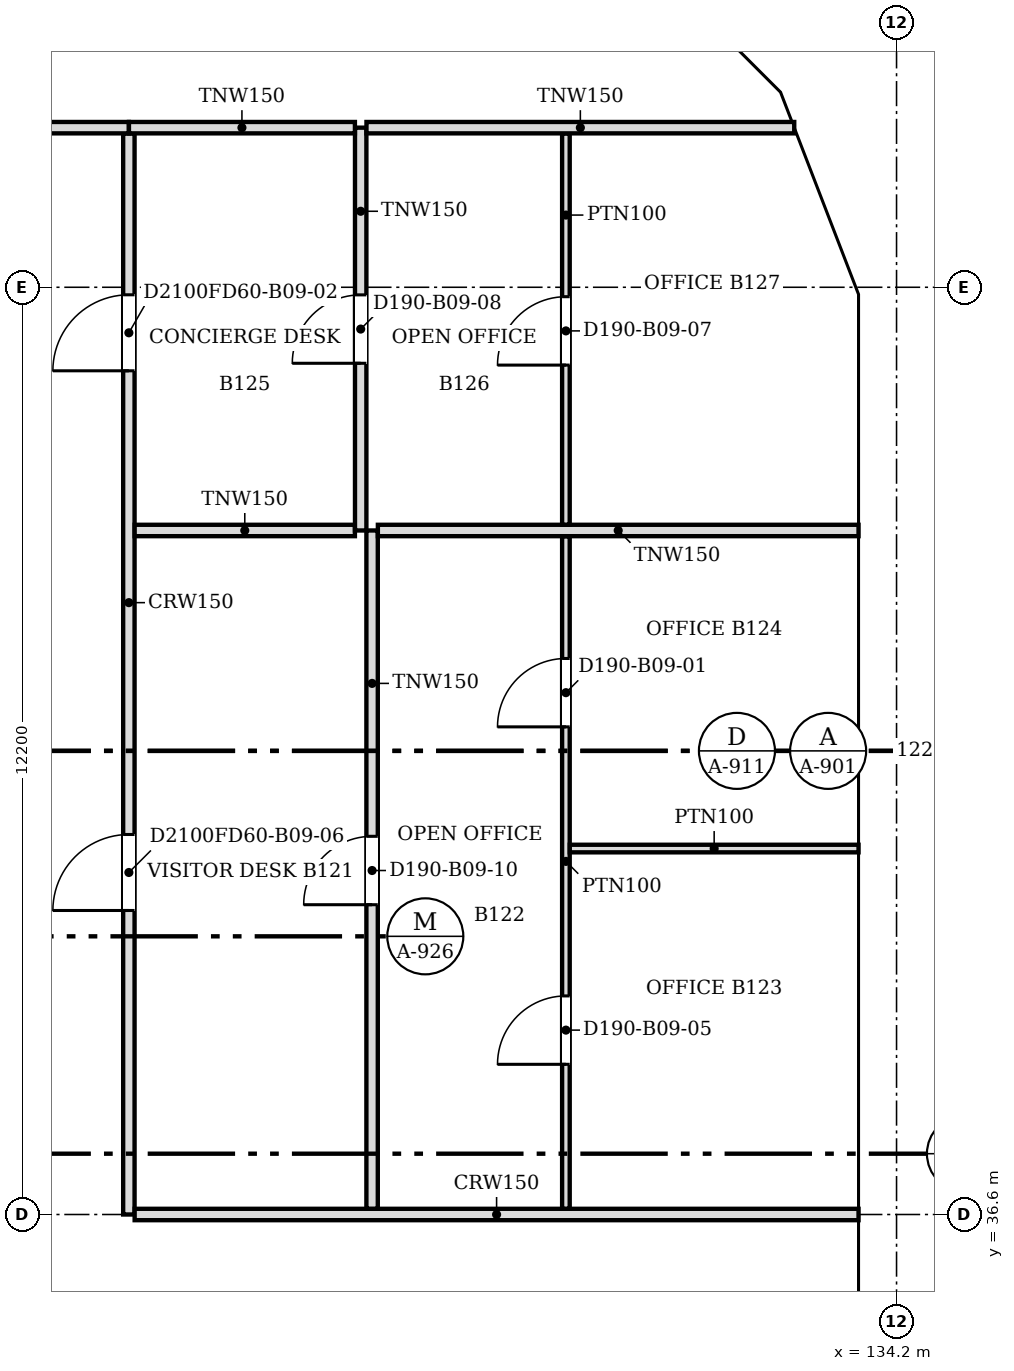
"""IFC4 building model, lengths in metres.
Left out: names, types, materials, properties, quantities, classifications, styles, units other than length and angle.
Written with IfcOpenShell. Run it as: python <this file> out.ifc"""

import sys

from ifc_helpers import new_model, si_unit, direction, frame, frame_2d, origin, place, context, subcontext, project, spatial, polyline, rectangle, outline, extrude, faceted_brep, source, transform, mapped, element, fill, save


model = new_model("IFC4")
c1 = context("Model", 3, precision=1e-05, world=origin(), true_north=direction((0.0, 1.0)))
c2 = subcontext(c1, "Body", "Model", "MODEL_VIEW")
j1 = project(units=[si_unit("LENGTHUNIT", "METRE"), si_unit("PLANEANGLEUNIT", "RADIAN")], contexts=[c1])
p1 = place(None, origin())
s1 = spatial("IfcSite", under=j1, at=p1, CompositionType="ELEMENT")
p2 = place(p1, origin())
s2 = spatial("IfcBuilding", under=s1, at=p2, CompositionType="ELEMENT")
p3 = place(p2, frame((0.0, 0.0, 87.6)))
s3 = spatial("IfcBuildingStorey", under=s2, at=p3, CompositionType="ELEMENT", Elevation=87.6)
m1 = source(origin(), c2, "Body", "Brep", [
    faceted_brep([(3.05, -0.25, 0.0), (6.1, -0.25, 3.8), (6.1, -0.25, 3.8), (3.05, -0.25, 7.6), (0.0, -0.25, 3.8), (0.0, 0.25, 3.8), (3.05, 0.25, 7.6), (6.1, 0.25, 3.8), (6.1, 0.25, 3.8), (3.05, 0.25, 0.0)], [[[0, 1, 2, 3, 4]], [[5, 6, 7, 8, 9]], [[9, 8, 1, 0]], [[7, 6, 3, 2]], [[6, 5, 4, 3]], [[5, 9, 0, 4]], [[1, 8, 7, 2]]]),
])
p4 = place(p3, frame((133.95, 33.55, -3.8), z_axis=(0.0, 0.0, 1.0), x_axis=(0.0, 1.0, 0.0)))
e1 = element("IfcWall", 1, at=p4, inside=s3, PredefinedType="SOLIDWALL", context=c2, shape_type="MappedRepresentation", body=[
    mapped(m1, transform((0.0, 0.0, 0.0), scale=1.0)),
])
m2 = source(origin(), c2, "Body", "SweptSolid", [
    extrude(outline(polyline([(3.05, 0.399), (5.78, 3.8), (3.05, 7.2), (0.321, 3.8), (3.05, 0.399)])), frame((0.0, 0.26, 0.0), z_axis=(0.0, -1.0, 0.0), x_axis=(1.0, 0.0, 0.0)), (0.0, 0.0, 1.0), 0.52),
])
p5 = place(p4, origin())
e2 = element("IfcOpeningElement", 2, at=p5, cuts=e1, PredefinedType="OPENING", context=c2, shape_type="MappedRepresentation", body=[
    mapped(m2, transform((0.0, 0.0, 0.0), scale=1.0)),
])
m3 = source(origin(), c2, "Body", "SweptSolid", [
    extrude(outline(polyline([(3.05, 0.0), (6.1, 3.8), (3.05, 7.6), (0.0, 3.8), (3.05, 0.0)])), frame((0.0, 0.25, 0.0), z_axis=(0.0, -1.0, 0.0), x_axis=(1.0, 0.0, 0.0)), (0.0, 0.0, 1.0), 0.5),
])
p6 = place(p3, frame((133.95, 39.65, -3.8), z_axis=(0.0, 0.0, 1.0), x_axis=(0.0, 1.0, 0.0)))
e3 = element("IfcWall", 3, at=p6, inside=s3, PredefinedType="SOLIDWALL", context=c2, shape_type="MappedRepresentation", body=[
    mapped(m3, transform((0.0, 0.0, 0.0), scale=1.0)),
])
p7 = place(p6, origin())
e4 = element("IfcOpeningElement", 4, at=p7, cuts=e3, PredefinedType="OPENING", context=c2, shape_type="MappedRepresentation", body=[
    mapped(m2, transform((0.0, 0.0, 0.0), scale=1.0)),
])
m4 = source(origin(), c2, "Body", "Brep", [
    faceted_brep([(3.003, -0.25, 0.0), (3.05, -0.25, 0.06), (3.05, -0.25, 7.54), (3.003, -0.25, 7.6), (0.0, -0.25, 3.8), (0.0, 0.25, 3.8), (2.957, 0.25, 7.541), (2.957, 0.25, 0.059), (3.003, 0.0, 0.0), (3.003, 0.0, 7.6)], [[[0, 1, 2, 3, 4]], [[5, 6, 7]], [[1, 0, 8]], [[9, 3, 2]], [[6, 5, 4, 3, 9]], [[5, 7, 8, 0, 4]], [[1, 8, 7, 6, 9, 2]]]),
])
p8 = place(p3, frame((133.95, 45.75, -3.8), z_axis=(0.0, 0.0, 1.0), x_axis=(0.0, 1.0, 0.0)))
e5 = element("IfcWall", 5, at=p8, inside=s3, PredefinedType="SOLIDWALL", context=c2, shape_type="MappedRepresentation", body=[
    mapped(m4, transform((0.0, 0.0, 0.0), scale=1.0)),
])
m5 = source(origin(), c2, "Body", "SweptSolid", [
    extrude(outline(polyline([(2.803, 6.944), (0.319, 3.8), (2.803, 0.656), (2.803, 6.944)])), frame((0.0, 0.26, 0.0), z_axis=(0.0, -1.0, 0.0), x_axis=(1.0, 0.0, 0.0)), (0.0, 0.0, 1.0), 0.52),
])
p9 = place(p8, origin())
e6 = element("IfcOpeningElement", 6, at=p9, cuts=e5, PredefinedType="OPENING", context=c2, shape_type="MappedRepresentation", body=[
    mapped(m5, transform((0.0, 0.0, 0.0), scale=1.0)),
])
m6 = source(origin(), c2, "Body", "Brep", [
    faceted_brep([(0.047, -0.25, 0.0), (2.997, -0.25, 3.8), (0.047, -0.25, 7.6), (0.0, -0.25, 7.541), (0.0, -0.25, 0.059), (0.093, 0.25, 7.54), (2.944, 0.25, 3.868), (2.944, 0.25, 3.732), (0.093, 0.25, 0.06), (2.997, 0.0, 3.8), (0.047, 0.0, 0.0), (0.047, 0.0, 7.6)], [[[0, 1, 2, 3, 4]], [[5, 6, 7, 8]], [[8, 7, 9, 1, 0, 10]], [[6, 5, 11, 2, 1, 9]], [[3, 2, 11]], [[10, 0, 4]], [[8, 10, 4, 3, 11, 5]], [[7, 6, 9]]]),
])
p10 = place(p3, frame((133.967, 48.71, -3.8), z_axis=(0.0, 0.0, 1.0), x_axis=(-0.359901446078, 0.932990326376, 0.0)))
e7 = element("IfcWall", 7, at=p10, inside=s3, PredefinedType="SOLIDWALL", context=c2, shape_type="MappedRepresentation", body=[
    mapped(m6, transform((0.0, 0.0, 0.0), scale=1.0)),
])
m7 = source(origin(), c2, "Body", "SweptSolid", [
    extrude(outline(polyline([(0.247, 0.665), (2.681, 3.8), (0.247, 6.935), (0.247, 0.665)])), frame((0.0, 0.26, 0.0), z_axis=(0.0, -1.0, 0.0), x_axis=(1.0, 0.0, 0.0)), (0.0, 0.0, 1.0), 0.52),
])
p11 = place(p10, origin())
e8 = element("IfcOpeningElement", 8, at=p11, cuts=e7, PredefinedType="OPENING", context=c2, shape_type="MappedRepresentation", body=[
    mapped(m7, transform((0.0, 0.0, 0.0), scale=1.0)),
])
m8 = source(origin(), c2, "Body", "Brep", [
    faceted_brep([(2.944, -0.25, 0.0), (2.997, -0.25, 0.068), (2.997, -0.25, 7.532), (2.944, -0.25, 7.6), (0.0, -0.25, 3.8), (0.053, 0.25, 3.868), (2.891, 0.25, 7.532), (2.891, 0.25, 0.068), (0.053, 0.25, 3.732), (2.944, 0.0, 0.0), (2.944, 0.0, 7.6), (0.0, 0.0, 3.8)], [[[0, 1, 2, 3, 4]], [[5, 6, 7, 8]], [[1, 0, 9]], [[10, 3, 2]], [[6, 5, 11, 4, 3, 10]], [[8, 7, 9, 0, 4, 11]], [[8, 11, 5]], [[1, 9, 7, 6, 10, 2]]]),
])
p12 = place(p3, frame((132.888, 51.506, -3.8), z_axis=(0.0, 0.0, 1.0), x_axis=(-0.707147509625, 0.707066050402, 0.0)))
e9 = element("IfcWall", 9, at=p12, inside=s3, PredefinedType="SOLIDWALL", context=c2, shape_type="MappedRepresentation", body=[
    mapped(m8, transform((0.0, 0.0, 0.0), scale=1.0)),
])
m9 = source(origin(), c2, "Body", "SweptSolid", [
    extrude(outline(polyline([(2.744, 6.934), (0.316, 3.8), (2.744, 0.666), (2.744, 6.934)])), frame((0.0, 0.26, 0.0), z_axis=(0.0, -1.0, 0.0), x_axis=(1.0, 0.0, 0.0)), (0.0, 0.0, 1.0), 0.52),
])
p13 = place(p12, origin())
e10 = element("IfcOpeningElement", 10, at=p13, cuts=e9, PredefinedType="OPENING", context=c2, shape_type="MappedRepresentation", body=[
    mapped(m9, transform((0.0, 0.0, 0.0), scale=1.0)),
])
p14 = place(p2, frame((0.0, 0.0, 91.4)))
s4 = spatial("IfcBuildingStorey", under=s2, at=p14, CompositionType="ELEMENT", Elevation=91.4)
m10 = source(origin(), c2, "Body", "SweptSolid", [
    extrude(outline(polyline([(3.05, 0.0), (6.1, 3.8), (3.05, 7.6), (0.0, 3.8), (3.05, 0.0)])), frame((0.0, 0.25, 0.0), z_axis=(0.0, -1.0, 0.0), x_axis=(1.0, 0.0, 0.0)), (0.0, 0.0, 1.0), 0.5),
])
p15 = place(p14, frame((133.95, 30.5, -3.8), z_axis=(0.0, 0.0, 1.0), x_axis=(0.0, 1.0, 0.0)))
e11 = element("IfcWall", 11, at=p15, inside=s4, PredefinedType="SOLIDWALL", context=c2, shape_type="MappedRepresentation", body=[
    mapped(m10, transform((0.0, 0.0, 0.0), scale=1.0)),
])
m11 = source(origin(), c2, "Body", "SweptSolid", [
    extrude(outline(polyline([(3.05, 0.399), (5.78, 3.8), (3.05, 7.2), (0.321, 3.8), (3.05, 0.399)])), frame((0.0, 0.26, 0.0), z_axis=(0.0, -1.0, 0.0), x_axis=(1.0, 0.0, 0.0)), (0.0, 0.0, 1.0), 0.52),
])
p16 = place(p15, origin())
e12 = element("IfcOpeningElement", 12, at=p16, cuts=e11, PredefinedType="OPENING", context=c2, shape_type="MappedRepresentation", body=[
    mapped(m11, transform((0.0, 0.0, 0.0), scale=1.0)),
])
m12 = source(origin(), c2, "Body", "Brep", [
    faceted_brep([(3.05, -0.25, 0.0), (6.1, -0.25, 3.8), (6.1, -0.25, 3.8), (3.05, -0.25, 7.6), (0.0, -0.25, 3.8), (0.0, 0.25, 3.8), (3.05, 0.25, 7.6), (6.1, 0.25, 3.8), (6.1, 0.25, 3.8), (3.05, 0.25, 0.0)], [[[0, 1, 2, 3, 4]], [[5, 6, 7, 8, 9]], [[9, 8, 1, 0]], [[7, 6, 3, 2]], [[6, 5, 4, 3]], [[5, 9, 0, 4]], [[1, 8, 7, 2]]]),
])
p17 = place(p14, frame((133.95, 36.6, -3.8), z_axis=(0.0, 0.0, 1.0), x_axis=(0.0, 1.0, 0.0)))
e13 = element("IfcWall", 13, at=p17, inside=s4, PredefinedType="SOLIDWALL", context=c2, shape_type="MappedRepresentation", body=[
    mapped(m12, transform((0.0, 0.0, 0.0), scale=1.0)),
])
p18 = place(p17, origin())
e14 = element("IfcOpeningElement", 14, at=p18, cuts=e13, PredefinedType="OPENING", context=c2, shape_type="MappedRepresentation", body=[
    mapped(m11, transform((0.0, 0.0, 0.0), scale=1.0)),
])
m13 = source(origin(), c2, "Body", "Brep", [
    faceted_brep([(3.05, -0.25, 0.0), (6.053, -0.25, 3.8), (3.05, -0.25, 7.6), (0.0, -0.25, 3.8), (0.0, 0.25, 3.8), (3.05, 0.25, 7.6), (6.007, 0.25, 3.859), (6.007, 0.25, 3.741), (3.05, 0.25, 0.0), (6.053, 0.0, 3.8)], [[[0, 1, 2, 3]], [[4, 5, 6, 7, 8]], [[8, 7, 9, 1, 0]], [[6, 5, 2, 1, 9]], [[5, 4, 3, 2]], [[4, 8, 0, 3]], [[9, 7, 6]]]),
])
p19 = place(p14, frame((133.95, 42.7, -3.8), z_axis=(0.0, 0.0, 1.0), x_axis=(0.0, 1.0, 0.0)))
e15 = element("IfcWall", 15, at=p19, inside=s4, PredefinedType="SOLIDWALL", context=c2, shape_type="MappedRepresentation", body=[
    mapped(m13, transform((0.0, 0.0, 0.0), scale=1.0)),
])
m14 = source(origin(), c2, "Body", "SweptSolid", [
    extrude(outline(polyline([(3.049, 0.401), (5.735, 3.8), (3.049, 7.199), (0.321, 3.8), (3.049, 0.401)])), frame((0.0, 0.26, 0.0), z_axis=(0.0, -1.0, 0.0), x_axis=(1.0, 0.0, 0.0)), (0.0, 0.0, 1.0), 0.52),
])
p20 = place(p19, origin())
e16 = element("IfcOpeningElement", 16, at=p20, cuts=e15, PredefinedType="OPENING", context=c2, shape_type="MappedRepresentation", body=[
    mapped(m14, transform((0.0, 0.0, 0.0), scale=1.0)),
])
m15 = source(origin(), c2, "Body", "Brep", [
    faceted_brep([(2.95, -0.25, 0.0), (3.003, -0.25, 0.068), (3.003, -0.25, 7.531), (2.95, -0.25, 7.6), (0.0, -0.25, 3.8), (0.047, 0.25, 3.86), (2.898, 0.25, 7.532), (2.898, 0.25, 0.068), (0.047, 0.25, 3.74), (2.95, 0.0, 0.0), (2.95, 0.0, 7.6), (0.0, 0.0, 3.8)], [[[0, 1, 2, 3, 4]], [[5, 6, 7, 8]], [[1, 0, 9]], [[10, 3, 2]], [[6, 5, 11, 4, 3, 10]], [[8, 7, 9, 0, 4, 11]], [[8, 11, 5]], [[1, 9, 7, 6, 10, 2]]]),
])
p21 = place(p14, frame((133.95, 48.753, -3.8), z_axis=(0.0, 0.0, 1.0), x_axis=(-0.359855894603, 0.933007896601, 0.0)))
e17 = element("IfcWall", 17, at=p21, inside=s4, PredefinedType="SOLIDWALL", context=c2, shape_type="MappedRepresentation", body=[
    mapped(m15, transform((0.0, 0.0, 0.0), scale=1.0)),
])
m16 = source(origin(), c2, "Body", "SweptSolid", [
    extrude(outline(polyline([(2.75, 6.935), (0.316, 3.8), (2.75, 0.665), (2.75, 6.935)])), frame((0.0, 0.26, 0.0), z_axis=(0.0, -1.0, 0.0), x_axis=(1.0, 0.0, 0.0)), (0.0, 0.0, 1.0), 0.52),
])
p22 = place(p21, origin())
e18 = element("IfcOpeningElement", 18, at=p22, cuts=e17, PredefinedType="OPENING", context=c2, shape_type="MappedRepresentation", body=[
    mapped(m16, transform((0.0, 0.0, 0.0), scale=1.0)),
])
m17 = source(origin(), c2, "Body", "Brep", [
    faceted_brep([(0.053, -0.25, 0.0), (2.997, -0.25, 3.8), (0.053, -0.25, 7.6), (0.0, -0.25, 7.532), (0.0, -0.25, 0.068), (0.106, 0.25, 7.531), (2.944, 0.25, 3.868), (2.944, 0.25, 3.732), (0.106, 0.25, 0.068), (2.997, 0.0, 3.8), (0.053, 0.0, 0.0), (0.053, 0.0, 7.6)], [[[0, 1, 2, 3, 4]], [[5, 6, 7, 8]], [[8, 7, 9, 1, 0, 10]], [[6, 5, 11, 2, 1, 9]], [[3, 2, 11]], [[10, 0, 4]], [[8, 10, 4, 3, 11, 5]], [[9, 7, 6]]]),
])
p23 = place(p14, frame((132.926, 51.469, -3.8), z_axis=(0.0, 0.0, 1.0), x_axis=(-0.707066050402, 0.707147509625, 0.0)))
e19 = element("IfcWall", 19, at=p23, inside=s4, PredefinedType="SOLIDWALL", context=c2, shape_type="MappedRepresentation", body=[
    mapped(m17, transform((0.0, 0.0, 0.0), scale=1.0)),
])
m18 = source(origin(), c2, "Body", "SweptSolid", [
    extrude(outline(polyline([(0.253, 0.666), (2.681, 3.8), (0.253, 6.934), (0.253, 0.666)])), frame((0.0, 0.26, 0.0), z_axis=(0.0, -1.0, 0.0), x_axis=(1.0, 0.0, 0.0)), (0.0, 0.0, 1.0), 0.52),
])
p24 = place(p23, origin())
e20 = element("IfcOpeningElement", 20, at=p24, cuts=e19, PredefinedType="OPENING", context=c2, shape_type="MappedRepresentation", body=[
    mapped(m18, transform((0.0, 0.0, 0.0), scale=1.0)),
])
p25 = place(p3, frame((124.1, 50.824, 0.0), z_axis=(0.0, 0.0, 1.0), x_axis=(0.0, -1.0, 0.0)))
e21 = element("IfcWall", 21, at=p25, inside=s3, PredefinedType="PARTITIONING", context=c2, shape_type="SweptSolid", body=[
    extrude(rectangle(XDim=14.224, YDim=0.15, at=frame_2d((7.112, 0.0))), origin(), (0.0, 0.0, 1.0), 3.067),
])
m19 = source(origin(), c2, "Body", "SweptSolid", [
    extrude(rectangle(XDim=1.0, YDim=2.1, at=frame_2d((0.5, 1.05))), frame((0.0, 0.085, 0.0), z_axis=(0.0, -1.0, 0.0), x_axis=(1.0, 0.0, 0.0)), (0.0, 0.0, 1.0), 0.17),
])
p26 = place(p25, frame((2.123, 0.0, 0.0)))
e22 = element("IfcOpeningElement", 22, at=p26, cuts=e21, PredefinedType="OPENING", context=c2, shape_type="MappedRepresentation", body=[
    mapped(m19, transform((0.0, 0.0, 0.0), scale=1.0)),
])
p27 = place(p25, frame((9.224, 0.0, 0.0)))
e23 = element("IfcOpeningElement", 23, at=p27, cuts=e21, PredefinedType="OPENING", context=c2, shape_type="MappedRepresentation", body=[
    mapped(m19, transform((0.0, 0.0, 0.0), scale=1.0)),
])
p28 = place(p3, frame((124.176, 36.6, 0.0), z_axis=(0.0, 0.0, 1.0), x_axis=(1.0, 0.0, 0.0)))
e24 = element("IfcWall", 24, at=p28, inside=s3, PredefinedType="PARTITIONING", context=c2, shape_type="SweptSolid", body=[
    extrude(rectangle(XDim=9.524, YDim=0.15, at=frame_2d((4.762, 0.0))), origin(), (0.0, 0.0, 1.0), 3.067),
])
p29 = place(p3, frame((127.3, 45.6, 0.0), z_axis=(0.0, 0.0, 1.0), x_axis=(0.0, -1.0, 0.0)))
e25 = element("IfcWall", 25, at=p29, inside=s3, PredefinedType="PARTITIONING", context=c2, shape_type="SweptSolid", body=[
    extrude(rectangle(XDim=8.924, YDim=0.15, at=frame_2d((4.462, 0.0))), origin(), (0.0, 0.0, 1.0), 3.067),
])
m20 = source(origin(), c2, "Body", "SweptSolid", [
    extrude(rectangle(XDim=0.9, YDim=2.1, at=frame_2d((0.45, 1.05))), frame((0.0, 0.085, 0.0), z_axis=(0.0, -1.0, 0.0), x_axis=(1.0, 0.0, 0.0)), (0.0, 0.0, 1.0), 0.17),
])
p30 = place(p29, frame((4.024, 0.0, 0.0)))
e26 = element("IfcOpeningElement", 26, at=p30, cuts=e25, PredefinedType="OPENING", context=c2, shape_type="MappedRepresentation", body=[
    mapped(m20, transform((0.0, 0.0, 0.0), scale=1.0)),
])
p31 = place(p3, frame((129.85, 45.524, 0.0), z_axis=(0.0, 0.0, 1.0), x_axis=(0.0, -1.0, 0.0)))
e27 = element("IfcWall", 27, at=p31, inside=s3, PredefinedType="PARTITIONING", context=c2, shape_type="SweptSolid", body=[
    extrude(rectangle(XDim=8.848, YDim=0.1, at=frame_2d((4.424, 0.0))), origin(), (0.0, 0.0, 1.0), 3.067),
])
m21 = source(origin(), c2, "Body", "SweptSolid", [
    extrude(rectangle(XDim=0.9, YDim=2.1, at=frame_2d((0.45, 1.05))), frame((0.0, 0.06, 0.0), z_axis=(0.0, -1.0, 0.0), x_axis=(1.0, 0.0, 0.0)), (0.0, 0.0, 1.0), 0.12),
])
p32 = place(p31, frame((1.608, 0.0, 0.0)))
e28 = element("IfcOpeningElement", 28, at=p32, cuts=e27, PredefinedType="OPENING", context=c2, shape_type="MappedRepresentation", body=[
    mapped(m21, transform((0.0, 0.0, 0.0), scale=1.0)),
])
p33 = place(p31, frame((6.048, 0.0, 0.0)))
e29 = element("IfcOpeningElement", 29, at=p33, cuts=e27, PredefinedType="OPENING", context=c2, shape_type="MappedRepresentation", body=[
    mapped(m21, transform((0.0, 0.0, 0.0), scale=1.0)),
])
p34 = place(p3, frame((129.901, 41.415, 0.0), z_axis=(0.0, 0.0, 1.0), x_axis=(1.0, 0.0, 0.0)))
e30 = element("IfcWall", 30, at=p34, inside=s3, PredefinedType="PARTITIONING", context=c2, shape_type="SweptSolid", body=[
    extrude(rectangle(XDim=3.799, YDim=0.1, at=frame_2d((1.899, 0.0))), origin(), (0.0, 0.0, 1.0), 3.067),
])
p35 = place(p3, frame((124.176, 45.6, 0.0), z_axis=(0.0, 0.0, 1.0), x_axis=(1.0, 0.0, 0.0)))
e31 = element("IfcWall", 31, at=p35, inside=s3, PredefinedType="PARTITIONING", context=c2, shape_type="SweptSolid", body=[
    extrude(rectangle(XDim=2.898, YDim=0.15, at=frame_2d((1.449, 0.0))), origin(), (0.0, 0.0, 1.0), 3.067),
])
p36 = place(p3, frame((127.15, 50.9, 0.0), z_axis=(0.0, 0.0, 1.0), x_axis=(0.0, -1.0, 0.0)))
e32 = element("IfcWall", 32, at=p36, inside=s3, PredefinedType="PARTITIONING", context=c2, shape_type="SweptSolid", body=[
    extrude(rectangle(XDim=5.3, YDim=0.15, at=frame_2d((2.65, 0.0))), origin(), (0.0, 0.0, 1.0), 3.067),
])
p37 = place(p36, frame((2.2, 0.0, 0.0)))
e33 = element("IfcOpeningElement", 33, at=p37, cuts=e32, PredefinedType="OPENING", context=c2, shape_type="MappedRepresentation", body=[
    mapped(m20, transform((0.0, 0.0, 0.0), scale=1.0)),
])
p38 = place(p3, frame((127.376, 45.6, 0.0), z_axis=(0.0, 0.0, 1.0), x_axis=(1.0, 0.0, 0.0)))
e34 = element("IfcWall", 34, at=p38, inside=s3, PredefinedType="PARTITIONING", context=c2, shape_type="SweptSolid", body=[
    extrude(rectangle(XDim=6.324, YDim=0.15, at=frame_2d((3.162, 0.0))), origin(), (0.0, 0.0, 1.0), 3.067),
])
p39 = place(p3, frame((129.85, 50.824, 0.0), z_axis=(0.0, 0.0, 1.0), x_axis=(0.0, -1.0, 0.0)))
e35 = element("IfcWall", 35, at=p39, inside=s3, PredefinedType="PARTITIONING", context=c2, shape_type="SweptSolid", body=[
    extrude(rectangle(XDim=5.148, YDim=0.1, at=frame_2d((2.574, 0.0))), origin(), (0.0, 0.0, 1.0), 3.067),
])
p40 = place(p39, frame((2.148, 0.0, 0.0)))
e36 = element("IfcOpeningElement", 36, at=p40, cuts=e35, PredefinedType="OPENING", context=c2, shape_type="MappedRepresentation", body=[
    mapped(m21, transform((0.0, 0.0, 0.0), scale=1.0)),
])
p41 = place(p3, frame((108.5, 50.9, 0.0), z_axis=(0.0, 0.0, 1.0), x_axis=(1.0, 0.0, 0.0)))
e37 = element("IfcWall", 37, at=p41, inside=s3, PredefinedType="PARTITIONING", context=c2, shape_type="SweptSolid", body=[
    extrude(rectangle(XDim=15.6, YDim=0.15, at=frame_2d((7.8, 0.0))), origin(), (0.0, 0.0, 1.0), 3.067),
])
p42 = place(p41, frame((7.3, 0.0, 0.0)))
e38 = element("IfcOpeningElement", 38, at=p42, cuts=e37, PredefinedType="OPENING", context=c2, shape_type="MappedRepresentation", body=[
    mapped(m20, transform((0.0, 0.0, 0.0), scale=1.0)),
])
p43 = place(p3, frame((124.101, 50.9, 0.0), z_axis=(0.0, 0.0, 1.0), x_axis=(1.0, 0.0, 0.0)))
e39 = element("IfcWall", 39, at=p43, inside=s3, PredefinedType="PARTITIONING", context=c2, shape_type="SweptSolid", body=[
    extrude(rectangle(XDim=2.973, YDim=0.15, at=frame_2d((1.486, 0.0))), origin(), (0.0, 0.0, 1.0), 3.067),
])
p44 = place(p3, frame((127.226, 50.9, 0.0), z_axis=(0.0, 0.0, 1.0), x_axis=(1.0, 0.0, 0.0)))
e40 = element("IfcWall", 40, at=p44, inside=s3, PredefinedType="PARTITIONING", context=c2, shape_type="SweptSolid", body=[
    extrude(rectangle(XDim=5.628, YDim=0.15, at=frame_2d((2.814, 0.0))), origin(), (0.0, 0.0, 1.0), 3.067),
])
m22 = source(origin(), c2, "Body", "SweptSolid", [
    extrude(rectangle(XDim=0.9, YDim=2.1, at=frame_2d((0.45, 1.05))), frame((0.0, 0.025, 0.0), z_axis=(0.0, -1.0, 0.0), x_axis=(1.0, 0.0, 0.0)), (0.0, 0.0, 1.0), 0.05),
])
p45 = place(p32, origin())
e41 = element("IfcDoor", 41, at=p45, inside=s3, OperationType="SINGLE_SWING_RIGHT", PredefinedType="DOOR", context=c2, shape_type="MappedRepresentation", body=[
    mapped(m22, transform((0.0, 0.0, 0.0), scale=1.0)),
])
fill(e28, e41)
p46 = place(p33, origin())
e42 = element("IfcDoor", 42, at=p46, inside=s3, OperationType="SINGLE_SWING_RIGHT", PredefinedType="DOOR", context=c2, shape_type="MappedRepresentation", body=[
    mapped(m22, transform((0.0, 0.0, 0.0), scale=1.0)),
])
fill(e29, e42)
p47 = place(p40, origin())
e43 = element("IfcDoor", 43, at=p47, inside=s3, OperationType="SINGLE_SWING_RIGHT", PredefinedType="DOOR", context=c2, shape_type="MappedRepresentation", body=[
    mapped(m22, transform((0.0, 0.0, 0.0), scale=1.0)),
])
fill(e36, e43)
m23 = source(origin(), c2, "Body", "SweptSolid", [
    extrude(rectangle(XDim=1.0, YDim=2.1, at=frame_2d((0.5, 1.05))), frame((0.0, 0.025, 0.0), z_axis=(0.0, -1.0, 0.0), x_axis=(1.0, 0.0, 0.0)), (0.0, 0.0, 1.0), 0.05),
])
p48 = place(p26, origin())
e44 = element("IfcDoor", 44, at=p48, inside=s3, OperationType="SINGLE_SWING_RIGHT", PredefinedType="DOOR", context=c2, shape_type="MappedRepresentation", body=[
    mapped(m23, transform((0.0, 0.0, 0.0), scale=1.0)),
])
fill(e22, e44)
p49 = place(p37, origin())
e45 = element("IfcDoor", 45, at=p49, inside=s3, OperationType="SINGLE_SWING_RIGHT", PredefinedType="DOOR", context=c2, shape_type="MappedRepresentation", body=[
    mapped(m22, transform((0.0, 0.0, 0.0), scale=1.0)),
])
fill(e33, e45)
p50 = place(p30, origin())
e46 = element("IfcDoor", 46, at=p50, inside=s3, OperationType="SINGLE_SWING_RIGHT", PredefinedType="DOOR", context=c2, shape_type="MappedRepresentation", body=[
    mapped(m22, transform((0.0, 0.0, 0.0), scale=1.0)),
])
fill(e26, e46)
p51 = place(p27, origin())
e47 = element("IfcDoor", 47, at=p51, inside=s3, OperationType="SINGLE_SWING_RIGHT", PredefinedType="DOOR", context=c2, shape_type="MappedRepresentation", body=[
    mapped(m23, transform((0.0, 0.0, 0.0), scale=1.0)),
])
fill(e23, e47)
save(model, sys.argv[1])
